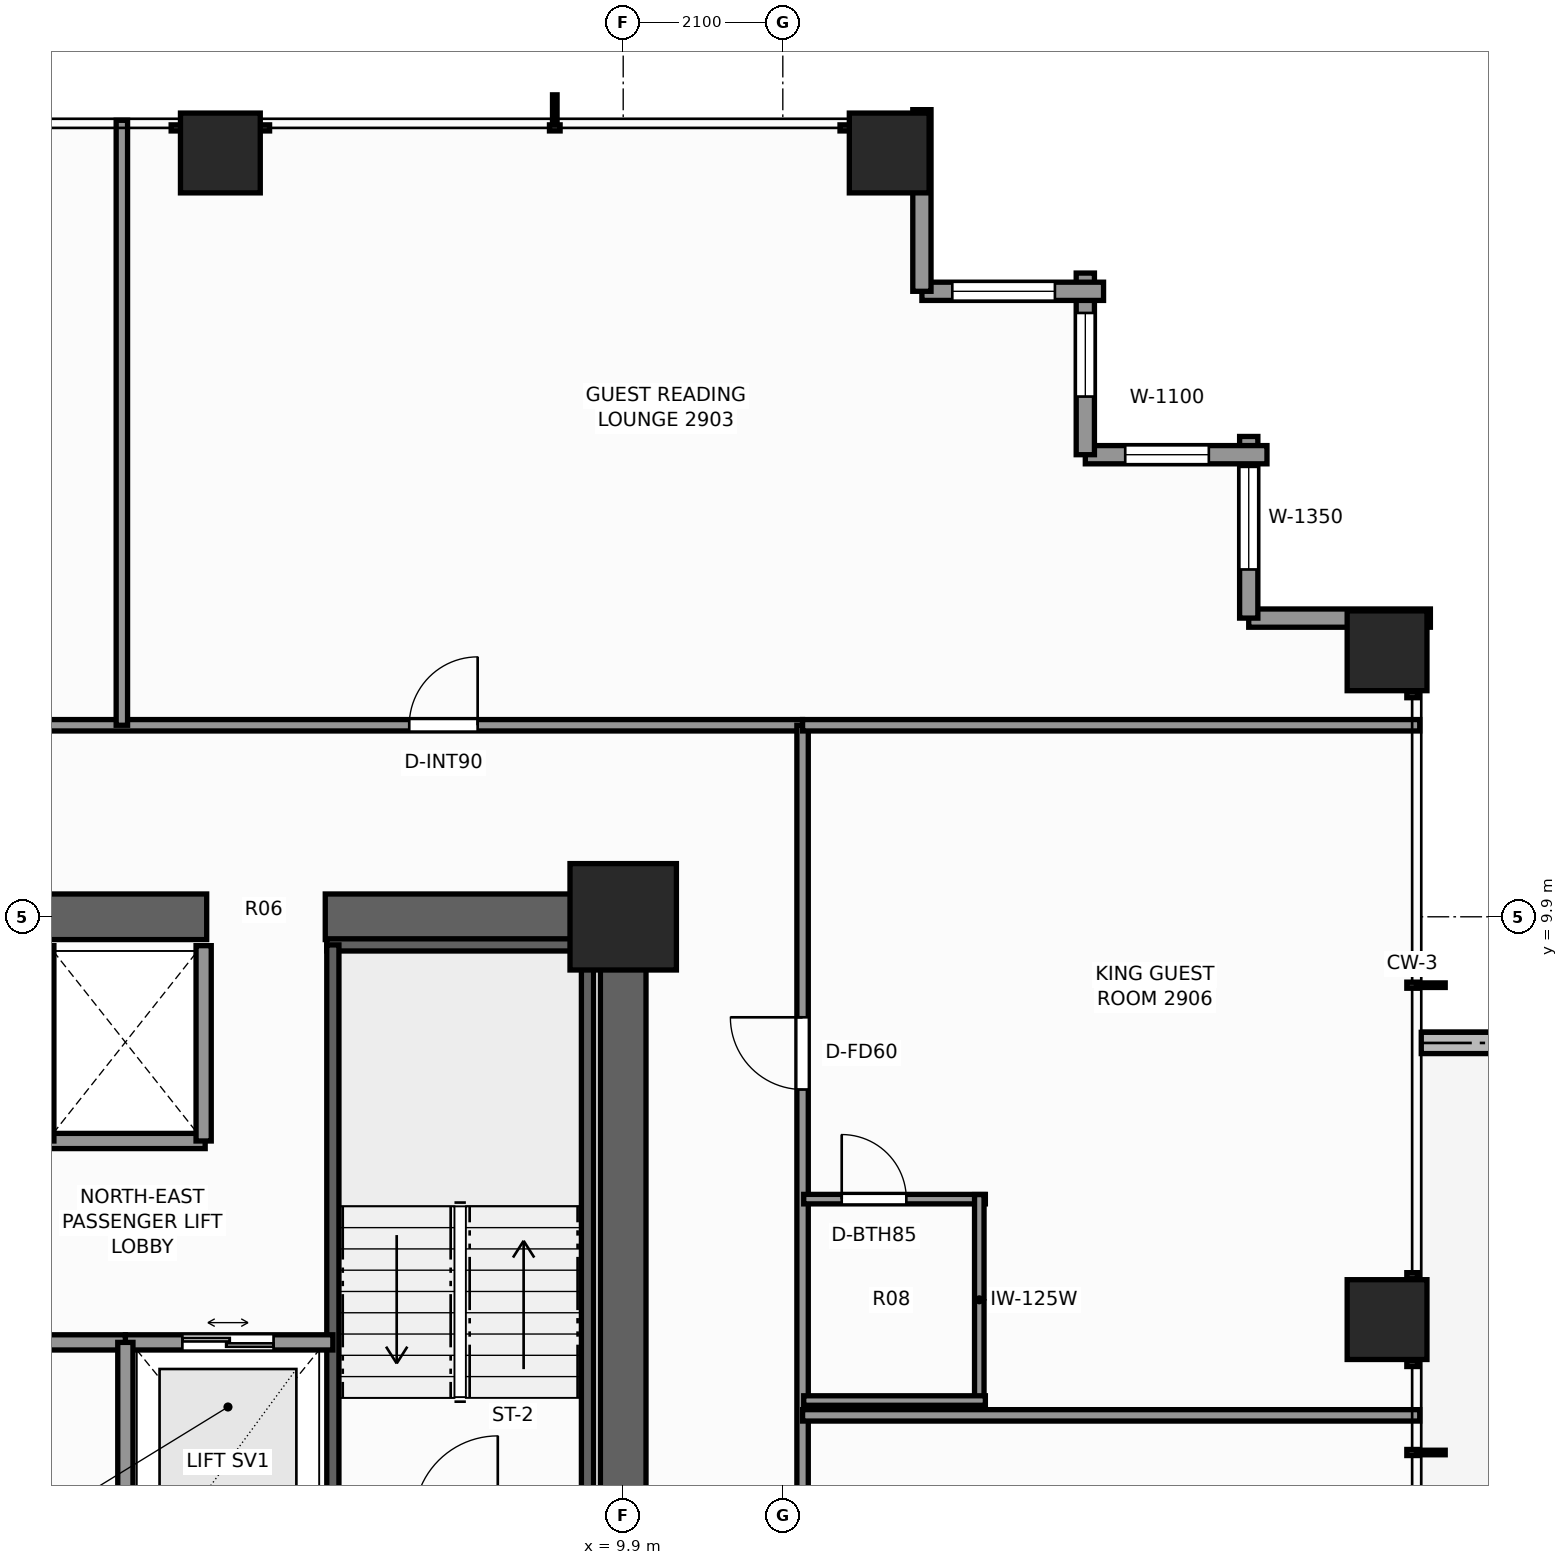
"""IFC4 building model, lengths in metres.
Left out: names, types, materials, properties, quantities, classifications, styles, units other than length and angle.
Written with IfcOpenShell. Run it as: python <this file> out.ifc"""

import sys

from ifc_helpers import new_model, si_unit, direction, frame, frame_2d, origin, origin_2d, place, context, subcontext, project, spatial, rectangle, extrude, element, fill, save


model = new_model("IFC4")
c1 = context("Model", 3, precision=1e-05, world=origin(), true_north=direction((0.0, 1.0)))
c2 = subcontext(c1, "Body", "Model", "MODEL_VIEW")
j1 = project(units=[si_unit("LENGTHUNIT", "METRE"), si_unit("PLANEANGLEUNIT", "RADIAN")], contexts=[c1])
p1 = place(None, origin())
s1 = spatial("IfcSite", under=j1, at=p1, CompositionType="ELEMENT")
p2 = place(p1, origin())
s2 = spatial("IfcBuilding", under=s1, at=p2, CompositionType="ELEMENT")
p3 = place(p2, frame((0.0, 0.0, 101.9)))
s3 = spatial("IfcBuildingStorey", under=s2, at=p3, CompositionType="ELEMENT", Elevation=101.9)
p4 = place(p3, frame((-10.2, 9.9, 0.0), z_axis=(0.0, 0.0, 1.0), x_axis=(1.0, 0.0, 0.0)))
e1 = element("IfcWall", 1, at=p4, inside=s3, PredefinedType="SHEAR", context=c2, shape_type="SweptSolid", body=[
    extrude(rectangle(XDim=14.62, YDim=0.6, at=frame_2d((7.31, 0.0))), origin(), (0.0, 0.0, 1.0), 3.3),
])
p5 = place(p3, frame((5.98, 9.9, 0.0), z_axis=(0.0, 0.0, 1.0), x_axis=(1.0, 0.0, 0.0)))
e2 = element("IfcWall", 2, at=p5, inside=s3, PredefinedType="SHEAR", context=c2, shape_type="SweptSolid", body=[
    extrude(rectangle(XDim=4.22, YDim=0.6, at=frame_2d((2.11, 0.0))), origin(), (0.0, 0.0, 1.0), 3.3),
])
p6 = place(p3, frame((9.9, -3.7, 0.0), z_axis=(0.0, 0.0, 1.0), x_axis=(0.0, 1.0, 0.0)))
e3 = element("IfcWall", 3, at=p6, inside=s3, PredefinedType="SHEAR", context=c2, shape_type="SweptSolid", body=[
    extrude(rectangle(XDim=13.3, YDim=0.6, at=frame_2d((6.65, 0.0))), origin(), (0.0, 0.0, 1.0), 3.3),
])
p7 = place(p6, frame((0.35, 0.0, 0.0)))
e4 = element("IfcOpeningElement", 4, at=p7, cuts=e3, PredefinedType="OPENING", context=c2, shape_type="SweptSolid", body=[
    extrude(rectangle(XDim=1.1, YDim=2.2, at=frame_2d((0.55, 1.1))), frame((0.0, 0.31, 0.0), z_axis=(0.0, -1.0, 0.0), x_axis=(1.0, 0.0, 0.0)), (0.0, 0.0, 1.0), 0.62),
])
p8 = place(p3, frame((9.9, 9.9, 0.0), z_axis=(0.0, 0.0, 1.0), x_axis=(1.0, 0.0, 0.0)))
e5 = element("IfcColumn", 5, at=p8, inside=s3, PredefinedType="COLUMN", context=c2, shape_type="SweptSolid", body=[
    extrude(rectangle(XDim=1.4, YDim=1.4, at=origin_2d()), origin(), (0.0, 0.0, 1.0), 3.3),
])
for number, where, z_axis, x_axis in (
    (6, (4.6, 19.95, 0.0), (0.0, 0.0, 1.0), (1.0, 0.0, 0.0)),
    (7, (13.4, 19.95, 0.0), (0.0, 0.0, 1.0), (1.0, 0.0, 0.0)),
    (8, (19.95, 4.6, 0.0), (0.0, 0.0, 1.0), (1.0, 0.0, 0.0)),
    (9, (19.95, 13.4, 0.0), (0.0, 0.0, 1.0), (1.0, 0.0, 0.0)),
):
    element("IfcColumn", number, at=place(p3, frame(where, z_axis=z_axis, x_axis=x_axis)), inside=s3, PredefinedType="COLUMN", context=c2, shape_type="SweptSolid", body=[
        extrude(rectangle(XDim=1.05, YDim=1.05, at=origin_2d()), origin(), (0.0, 0.0, 1.0), 3.3),
    ])
p9 = place(p3, frame((23.375, 8.24, -0.04), z_axis=(0.0, 0.0, 1.0), x_axis=(-1.0, 0.0, 0.0)))
e10 = element("IfcWall", 10, at=p9, inside=s3, PredefinedType="PARAPET", context=c2, shape_type="SweptSolid", body=[
    extrude(rectangle(XDim=2.975, YDim=0.28, at=frame_2d((1.487, 0.0))), origin(), (0.0, 0.0, 1.0), 0.42),
])
p10 = place(p3, frame((18.13, 13.83, 0.0), z_axis=(0.0, 0.0, 1.0), x_axis=(1.0, 0.0, 0.0)))
e11 = element("IfcWall", 11, at=p10, inside=s3, PredefinedType="STANDARD", context=c2, shape_type="SweptSolid", body=[
    extrude(rectangle(XDim=2.39, YDim=0.24, at=frame_2d((1.195, 0.0))), origin(), (0.0, 0.0, 1.0), 2.459),
])
p11 = place(p3, frame((18.13, 16.22, 0.0), z_axis=(0.0, 0.0, 1.0), x_axis=(0.0, -1.0, 0.0)))
e12 = element("IfcWall", 12, at=p11, inside=s3, PredefinedType="STANDARD", context=c2, shape_type="SweptSolid", body=[
    extrude(rectangle(XDim=2.39, YDim=0.24, at=frame_2d((1.195, 0.0))), origin(), (0.0, 0.0, 1.0), 2.459),
])
p12 = place(p11, frame((0.4, 0.0, 0.65)))
e13 = element("IfcOpeningElement", 13, at=p12, cuts=e12, PredefinedType="OPENING", context=c2, shape_type="SweptSolid", body=[
    extrude(rectangle(XDim=1.35, YDim=1.55, at=frame_2d((0.675, 0.775))), frame((0.0, 0.13, 0.0), z_axis=(0.0, -1.0, 0.0), x_axis=(1.0, 0.0, 0.0)), (0.0, 0.0, 1.0), 0.26),
])
p13 = place(p3, frame((15.98, 15.98, 0.0), z_axis=(0.0, 0.0, 1.0), x_axis=(1.0, 0.0, 0.0)))
e14 = element("IfcWall", 14, at=p13, inside=s3, PredefinedType="STANDARD", context=c2, shape_type="SweptSolid", body=[
    extrude(rectangle(XDim=2.39, YDim=0.24, at=frame_2d((1.195, 0.0))), origin(), (0.0, 0.0, 1.0), 2.459),
])
p14 = place(p13, frame((0.525, 0.0, 0.65)))
e15 = element("IfcOpeningElement", 15, at=p14, cuts=e14, PredefinedType="OPENING", context=c2, shape_type="SweptSolid", body=[
    extrude(rectangle(XDim=1.1, YDim=1.45, at=frame_2d((0.55, 0.725))), frame((0.0, 0.13, 0.0), z_axis=(0.0, -1.0, 0.0), x_axis=(1.0, 0.0, 0.0)), (0.0, 0.0, 1.0), 0.26),
])
p15 = place(p3, frame((15.98, 18.37, 0.0), z_axis=(0.0, 0.0, 1.0), x_axis=(0.0, -1.0, 0.0)))
e16 = element("IfcWall", 16, at=p15, inside=s3, PredefinedType="STANDARD", context=c2, shape_type="SweptSolid", body=[
    extrude(rectangle(XDim=2.39, YDim=0.24, at=frame_2d((1.195, 0.0))), origin(), (0.0, 0.0, 1.0), 2.459),
])
p16 = place(p15, frame((0.525, 0.0, 0.65)))
e17 = element("IfcOpeningElement", 17, at=p16, cuts=e16, PredefinedType="OPENING", context=c2, shape_type="SweptSolid", body=[
    extrude(rectangle(XDim=1.1, YDim=1.45, at=frame_2d((0.55, 0.725))), frame((0.0, 0.13, 0.0), z_axis=(0.0, -1.0, 0.0), x_axis=(1.0, 0.0, 0.0)), (0.0, 0.0, 1.0), 0.26),
])
p17 = place(p3, frame((13.83, 18.13, 0.0), z_axis=(0.0, 0.0, 1.0), x_axis=(1.0, 0.0, 0.0)))
e18 = element("IfcWall", 18, at=p17, inside=s3, PredefinedType="STANDARD", context=c2, shape_type="SweptSolid", body=[
    extrude(rectangle(XDim=2.39, YDim=0.24, at=frame_2d((1.195, 0.0))), origin(), (0.0, 0.0, 1.0), 2.459),
])
p18 = place(p17, frame((0.4, 0.0, 0.65)))
e19 = element("IfcOpeningElement", 19, at=p18, cuts=e18, PredefinedType="OPENING", context=c2, shape_type="SweptSolid", body=[
    extrude(rectangle(XDim=1.35, YDim=1.55, at=frame_2d((0.675, 0.775))), frame((0.0, 0.13, 0.0), z_axis=(0.0, -1.0, 0.0), x_axis=(1.0, 0.0, 0.0)), (0.0, 0.0, 1.0), 0.26),
])
p19 = place(p3, frame((13.83, 20.52, 0.0), z_axis=(0.0, 0.0, 1.0), x_axis=(0.0, -1.0, 0.0)))
e20 = element("IfcWall", 20, at=p19, inside=s3, PredefinedType="STANDARD", context=c2, shape_type="SweptSolid", body=[
    extrude(rectangle(XDim=2.39, YDim=0.24, at=frame_2d((1.195, 0.0))), origin(), (0.0, 0.0, 1.0), 2.459),
])
p20 = place(p3, frame((6.0, 9.53, 0.0), z_axis=(0.0, 0.0, 1.0), x_axis=(1.0, 0.0, 0.0)))
e21 = element("IfcWall", 21, at=p20, inside=s3, PredefinedType="SHEAR", context=c2, shape_type="SweptSolid", body=[
    extrude(rectangle(XDim=3.52, YDim=0.16, at=frame_2d((1.76, 0.0))), origin(), (0.0, 0.0, 1.0), 3.3),
])
for number, where, z_axis, x_axis in (
    (22, (6.08, 1.97, 0.0), (0.0, 0.0, 1.0), (0.0, 1.0, 0.0)),
    (23, (9.43, 1.97, 0.0), (0.0, 0.0, 1.0), (0.0, 1.0, 0.0)),
):
    element("IfcWall", number, at=place(p3, frame(where, z_axis=z_axis, x_axis=x_axis)), inside=s3, PredefinedType="SHEAR", context=c2, shape_type="SweptSolid", body=[
        extrude(rectangle(XDim=7.56, YDim=0.16, at=frame_2d((3.78, 0.0))), origin(), (0.0, 0.0, 1.0), 3.3),
    ])
p21 = place(p3, frame((3.35, 4.3, 0.0), z_axis=(0.0, 0.0, 1.0), x_axis=(1.0, 0.0, 0.0)))
e24 = element("IfcWall", 24, at=p21, inside=s3, PredefinedType="SOLIDWALL", context=c2, shape_type="SweptSolid", body=[
    extrude(rectangle(XDim=2.73, YDim=0.2, at=frame_2d((1.365, 0.0))), origin(), (0.0, 0.0, 1.0), 3.08),
])
p22 = place(p21, frame((0.75, 0.0, 0.0)))
e25 = element("IfcOpeningElement", 25, at=p22, cuts=e24, PredefinedType="OPENING", context=c2, shape_type="SweptSolid", body=[
    extrude(rectangle(XDim=1.2, YDim=2.25, at=frame_2d((0.6, 1.125))), frame((0.0, 0.11, 0.0), z_axis=(0.0, -1.0, 0.0), x_axis=(1.0, 0.0, 0.0)), (0.0, 0.0, 1.0), 0.22),
])
p23 = place(p3, frame((0.22, 6.95, 0.0), z_axis=(0.0, 0.0, 1.0), x_axis=(1.0, 0.0, 0.0)))
e26 = element("IfcWall", 26, at=p23, inside=s3, PredefinedType="SOLIDWALL", context=c2, shape_type="SweptSolid", body=[
    extrude(rectangle(XDim=4.18, YDim=0.2, at=frame_2d((2.09, 0.0))), origin(), (0.0, 0.0, 1.0), 3.08),
])
for number, where, z_axis, x_axis in (
    (27, (4.38, 6.95, 0.0), (0.0, 0.0, 1.0), (0.0, 1.0, 0.0)),
    (28, (2.31, 6.95, 0.0), (0.0, 0.0, 1.0), (0.0, 1.0, 0.0)),
):
    element("IfcWall", number, at=place(p3, frame(where, z_axis=z_axis, x_axis=x_axis)), inside=s3, PredefinedType="SOLIDWALL", context=c2, shape_type="SweptSolid", body=[
        extrude(rectangle(XDim=2.57, YDim=0.2, at=frame_2d((1.285, 0.0))), origin(), (0.0, 0.0, 1.0), 3.08),
    ])
p24 = place(p3, frame((0.22, 4.3, 0.0), z_axis=(0.0, 0.0, 1.0), x_axis=(1.0, 0.0, 0.0)))
e29 = element("IfcWall", 29, at=p24, inside=s3, PredefinedType="SOLIDWALL", context=c2, shape_type="SweptSolid", body=[
    extrude(rectangle(XDim=3.13, YDim=0.2, at=frame_2d((1.565, 0.0))), origin(), (0.0, 0.0, 1.0), 3.08),
])
p25 = place(p24, frame((1.05, 0.0, 0.0)))
e30 = element("IfcOpeningElement", 30, at=p25, cuts=e29, PredefinedType="OPENING", context=c2, shape_type="SweptSolid", body=[
    extrude(rectangle(XDim=0.95, YDim=2.06, at=frame_2d((0.475, 1.03))), frame((0.0, 0.11, 0.0), z_axis=(0.0, -1.0, 0.0), x_axis=(1.0, 0.0, 0.0)), (0.0, 0.0, 1.0), 0.22),
])
p26 = place(p3, frame((3.35, 1.1, 0.0), z_axis=(0.0, 0.0, 1.0), x_axis=(0.0, 1.0, 0.0)))
e31 = element("IfcWall", 31, at=p26, inside=s3, PredefinedType="SOLIDWALL", context=c2, shape_type="SweptSolid", body=[
    extrude(rectangle(XDim=3.2, YDim=0.2, at=frame_2d((1.6, 0.0))), origin(), (0.0, 0.0, 1.0), 3.08),
])
p27 = place(p3, frame((-12.26, 12.42, 0.0), z_axis=(0.0, 0.0, 1.0), x_axis=(1.0, 0.0, 0.0)))
e32 = element("IfcWall", 32, at=p27, inside=s3, PredefinedType="PARTITIONING", context=c2, shape_type="SweptSolid", body=[
    extrude(rectangle(XDim=24.52, YDim=0.15, at=frame_2d((12.26, 0.0))), origin(), (0.0, 0.0, 1.0), 2.292),
])
p28 = place(p27, frame((3.427, 0.0, 0.0)))
e33 = element("IfcOpeningElement", 33, at=p28, cuts=e32, PredefinedType="OPENING", context=c2, shape_type="SweptSolid", body=[
    extrude(rectangle(XDim=0.9, YDim=2.06, at=frame_2d((0.45, 1.03))), frame((0.0, 0.085, 0.0), z_axis=(0.0, -1.0, 0.0), x_axis=(1.0, 0.0, 0.0)), (0.0, 0.0, 1.0), 0.17),
])
p29 = place(p27, frame((9.78, 0.0, 0.0)))
e34 = element("IfcOpeningElement", 34, at=p29, cuts=e32, PredefinedType="OPENING", context=c2, shape_type="SweptSolid", body=[
    extrude(rectangle(XDim=0.9, YDim=2.06, at=frame_2d((0.45, 1.03))), frame((0.0, 0.085, 0.0), z_axis=(0.0, -1.0, 0.0), x_axis=(1.0, 0.0, 0.0)), (0.0, 0.0, 1.0), 0.17),
])
p30 = place(p27, frame((19.345, 0.0, 0.0)))
e35 = element("IfcOpeningElement", 35, at=p30, cuts=e32, PredefinedType="OPENING", context=c2, shape_type="SweptSolid", body=[
    extrude(rectangle(XDim=0.9, YDim=2.06, at=frame_2d((0.45, 1.03))), frame((0.0, 0.085, 0.0), z_axis=(0.0, -1.0, 0.0), x_axis=(1.0, 0.0, 0.0)), (0.0, 0.0, 1.0), 0.17),
])
p31 = place(p3, frame((12.26, -12.42, 0.0), z_axis=(0.0, 0.0, 1.0), x_axis=(0.0, 1.0, 0.0)))
e36 = element("IfcWall", 36, at=p31, inside=s3, PredefinedType="PARTITIONING", context=c2, shape_type="SweptSolid", body=[
    extrude(rectangle(XDim=24.84, YDim=0.15, at=frame_2d((12.42, 0.0))), origin(), (0.0, 0.0, 1.0), 2.292),
])
p32 = place(p31, frame((3.283, 0.0, 0.0)))
e37 = element("IfcOpeningElement", 37, at=p32, cuts=e36, PredefinedType="OPENING", context=c2, shape_type="SweptSolid", body=[
    extrude(rectangle(XDim=0.9, YDim=2.06, at=frame_2d((0.45, 1.03))), frame((0.0, 0.085, 0.0), z_axis=(0.0, -1.0, 0.0), x_axis=(1.0, 0.0, 0.0)), (0.0, 0.0, 1.0), 0.17),
])
p33 = place(p31, frame((9.94, 0.0, 0.0)))
e38 = element("IfcOpeningElement", 38, at=p33, cuts=e36, PredefinedType="OPENING", context=c2, shape_type="SweptSolid", body=[
    extrude(rectangle(XDim=0.9, YDim=2.06, at=frame_2d((0.45, 1.03))), frame((0.0, 0.085, 0.0), z_axis=(0.0, -1.0, 0.0), x_axis=(1.0, 0.0, 0.0)), (0.0, 0.0, 1.0), 0.17),
])
p34 = place(p31, frame((20.048, 0.0, 0.0)))
e39 = element("IfcOpeningElement", 39, at=p34, cuts=e36, PredefinedType="OPENING", context=c2, shape_type="SweptSolid", body=[
    extrude(rectangle(XDim=0.95, YDim=2.06, at=frame_2d((0.475, 1.03))), frame((0.0, 0.085, 0.0), z_axis=(0.0, -1.0, 0.0), x_axis=(1.0, 0.0, 0.0)), (0.0, 0.0, 1.0), 0.17),
])
p35 = place(p3, frame((12.26, 12.42, 0.0), z_axis=(0.0, 0.0, 1.0), x_axis=(1.0, 0.0, 0.0)))
e40 = element("IfcWall", 40, at=p35, inside=s3, PredefinedType="PARTITIONING", context=c2, shape_type="SweptSolid", body=[
    extrude(rectangle(XDim=8.12, YDim=0.15, at=frame_2d((4.06, 0.0))), origin(), (0.0, 0.0, 1.0), 2.292),
])
p36 = place(p3, frame((3.304, 12.42, 0.0), z_axis=(0.0, 0.0, 1.0), x_axis=(0.0, 1.0, 0.0)))
e41 = element("IfcWall", 41, at=p36, inside=s3, PredefinedType="PARTITIONING", context=c2, shape_type="SweptSolid", body=[
    extrude(rectangle(XDim=7.96, YDim=0.15, at=frame_2d((3.98, 0.0))), origin(), (0.0, 0.0, 1.0), 2.369),
])
p37 = place(p3, frame((12.26, 3.34, 0.0), z_axis=(0.0, 0.0, 1.0), x_axis=(1.0, 0.0, 0.0)))
e42 = element("IfcWall", 42, at=p37, inside=s3, PredefinedType="PARTITIONING", context=c2, shape_type="SweptSolid", body=[
    extrude(rectangle(XDim=8.12, YDim=0.15, at=frame_2d((4.06, 0.0))), origin(), (0.0, 0.0, 1.0), 2.449),
])
p38 = place(p3, frame((12.275, 6.185, 0.0), z_axis=(0.0, 0.0, 1.0), x_axis=(1.0, 0.0, 0.0)))
e43 = element("IfcWall", 43, at=p38, inside=s3, PredefinedType="PARTITIONING", context=c2, shape_type="SweptSolid", body=[
    extrude(rectangle(XDim=2.39, YDim=0.125, at=frame_2d((1.195, 0.0))), origin(), (0.0, 0.0, 1.0), 3.08),
])
p39 = place(p38, frame((0.5, 0.0, 0.0)))
e44 = element("IfcOpeningElement", 44, at=p39, cuts=e43, PredefinedType="OPENING", context=c2, shape_type="SweptSolid", body=[
    extrude(rectangle(XDim=0.85, YDim=2.03, at=frame_2d((0.425, 1.015))), frame((0.0, 0.073, 0.0), z_axis=(0.0, -1.0, 0.0), x_axis=(1.0, 0.0, 0.0)), (0.0, 0.0, 1.0), 0.145),
])
p40 = place(p3, frame((14.585, 3.475, 0.0), z_axis=(0.0, 0.0, 1.0), x_axis=(0.0, 1.0, 0.0)))
e45 = element("IfcWall", 45, at=p40, inside=s3, PredefinedType="PARTITIONING", context=c2, shape_type="SweptSolid", body=[
    extrude(rectangle(XDim=2.77, YDim=0.125, at=frame_2d((1.385, 0.0))), origin(), (0.0, 0.0, 1.0), 2.292),
])
p41 = place(p3, frame((12.275, 3.535, 0.0), z_axis=(0.0, 0.0, 1.0), x_axis=(1.0, 0.0, 0.0)))
e46 = element("IfcWall", 46, at=p41, inside=s3, PredefinedType="PARTITIONING", context=c2, shape_type="SweptSolid", body=[
    extrude(rectangle(XDim=2.39, YDim=0.125, at=frame_2d((1.195, 0.0))), origin(), (0.0, 0.0, 1.0), 3.08),
])
p42 = place(p12, origin())
e47 = element("IfcWindow", 47, at=p42, inside=s3, PartitioningType="SINGLE_PANEL", PredefinedType="WINDOW", context=c2, shape_type="SweptSolid", body=[
    extrude(rectangle(XDim=1.35, YDim=1.55, at=frame_2d((0.675, 0.775))), frame((0.0, 0.03, 0.0), z_axis=(0.0, -1.0, 0.0), x_axis=(1.0, 0.0, 0.0)), (0.0, 0.0, 1.0), 0.06),
])
fill(e13, e47)
p43 = place(p14, origin())
e48 = element("IfcWindow", 48, at=p43, inside=s3, PartitioningType="SINGLE_PANEL", PredefinedType="WINDOW", context=c2, shape_type="SweptSolid", body=[
    extrude(rectangle(XDim=1.1, YDim=1.45, at=frame_2d((0.55, 0.725))), frame((0.0, 0.03, 0.0), z_axis=(0.0, -1.0, 0.0), x_axis=(1.0, 0.0, 0.0)), (0.0, 0.0, 1.0), 0.06),
])
fill(e15, e48)
p44 = place(p16, origin())
e49 = element("IfcWindow", 49, at=p44, inside=s3, PartitioningType="SINGLE_PANEL", PredefinedType="WINDOW", context=c2, shape_type="SweptSolid", body=[
    extrude(rectangle(XDim=1.1, YDim=1.45, at=frame_2d((0.55, 0.725))), frame((0.0, 0.03, 0.0), z_axis=(0.0, -1.0, 0.0), x_axis=(1.0, 0.0, 0.0)), (0.0, 0.0, 1.0), 0.06),
])
fill(e17, e49)
p45 = place(p18, origin())
e50 = element("IfcWindow", 50, at=p45, inside=s3, PartitioningType="SINGLE_PANEL", PredefinedType="WINDOW", context=c2, shape_type="SweptSolid", body=[
    extrude(rectangle(XDim=1.35, YDim=1.55, at=frame_2d((0.675, 0.775))), frame((0.0, 0.03, 0.0), z_axis=(0.0, -1.0, 0.0), x_axis=(1.0, 0.0, 0.0)), (0.0, 0.0, 1.0), 0.06),
])
fill(e19, e50)
p46 = place(p22, origin())
e51 = element("IfcDoor", 51, at=p46, inside=s3, OperationType="DOUBLE_DOOR_SLIDING", PredefinedType="DOOR", context=c2, shape_type="SweptSolid", body=[
    extrude(rectangle(XDim=1.2, YDim=2.25, at=frame_2d((0.6, 1.125))), frame((0.0, 0.025, 0.0), z_axis=(0.0, -1.0, 0.0), x_axis=(1.0, 0.0, 0.0)), (0.0, 0.0, 1.0), 0.05),
])
fill(e25, e51)
p47 = place(p30, origin())
e52 = element("IfcDoor", 52, at=p47, inside=s3, OperationType="SINGLE_SWING_RIGHT", PredefinedType="DOOR", context=c2, shape_type="SweptSolid", body=[
    extrude(rectangle(XDim=0.9, YDim=2.06, at=frame_2d((0.45, 1.03))), frame((0.0, 0.025, 0.0), z_axis=(0.0, -1.0, 0.0), x_axis=(1.0, 0.0, 0.0)), (0.0, 0.0, 1.0), 0.05),
])
fill(e35, e52)
p48 = place(p39, origin())
e53 = element("IfcDoor", 53, at=p48, inside=s3, OperationType="SINGLE_SWING_LEFT", PredefinedType="DOOR", context=c2, shape_type="SweptSolid", body=[
    extrude(rectangle(XDim=0.85, YDim=2.03, at=frame_2d((0.425, 1.015))), frame((0.0, 0.025, 0.0), z_axis=(0.0, -1.0, 0.0), x_axis=(1.0, 0.0, 0.0)), (0.0, 0.0, 1.0), 0.05),
])
fill(e44, e53)
p49 = place(p34, origin())
e54 = element("IfcDoor", 54, at=p49, inside=s3, OperationType="SINGLE_SWING_RIGHT", PredefinedType="DOOR", context=c2, shape_type="SweptSolid", body=[
    extrude(rectangle(XDim=0.95, YDim=2.06, at=frame_2d((0.475, 1.03))), frame((0.0, 0.025, 0.0), z_axis=(0.0, -1.0, 0.0), x_axis=(1.0, 0.0, 0.0)), (0.0, 0.0, 1.0), 0.05),
])
fill(e39, e54)
save(model, sys.argv[1])
